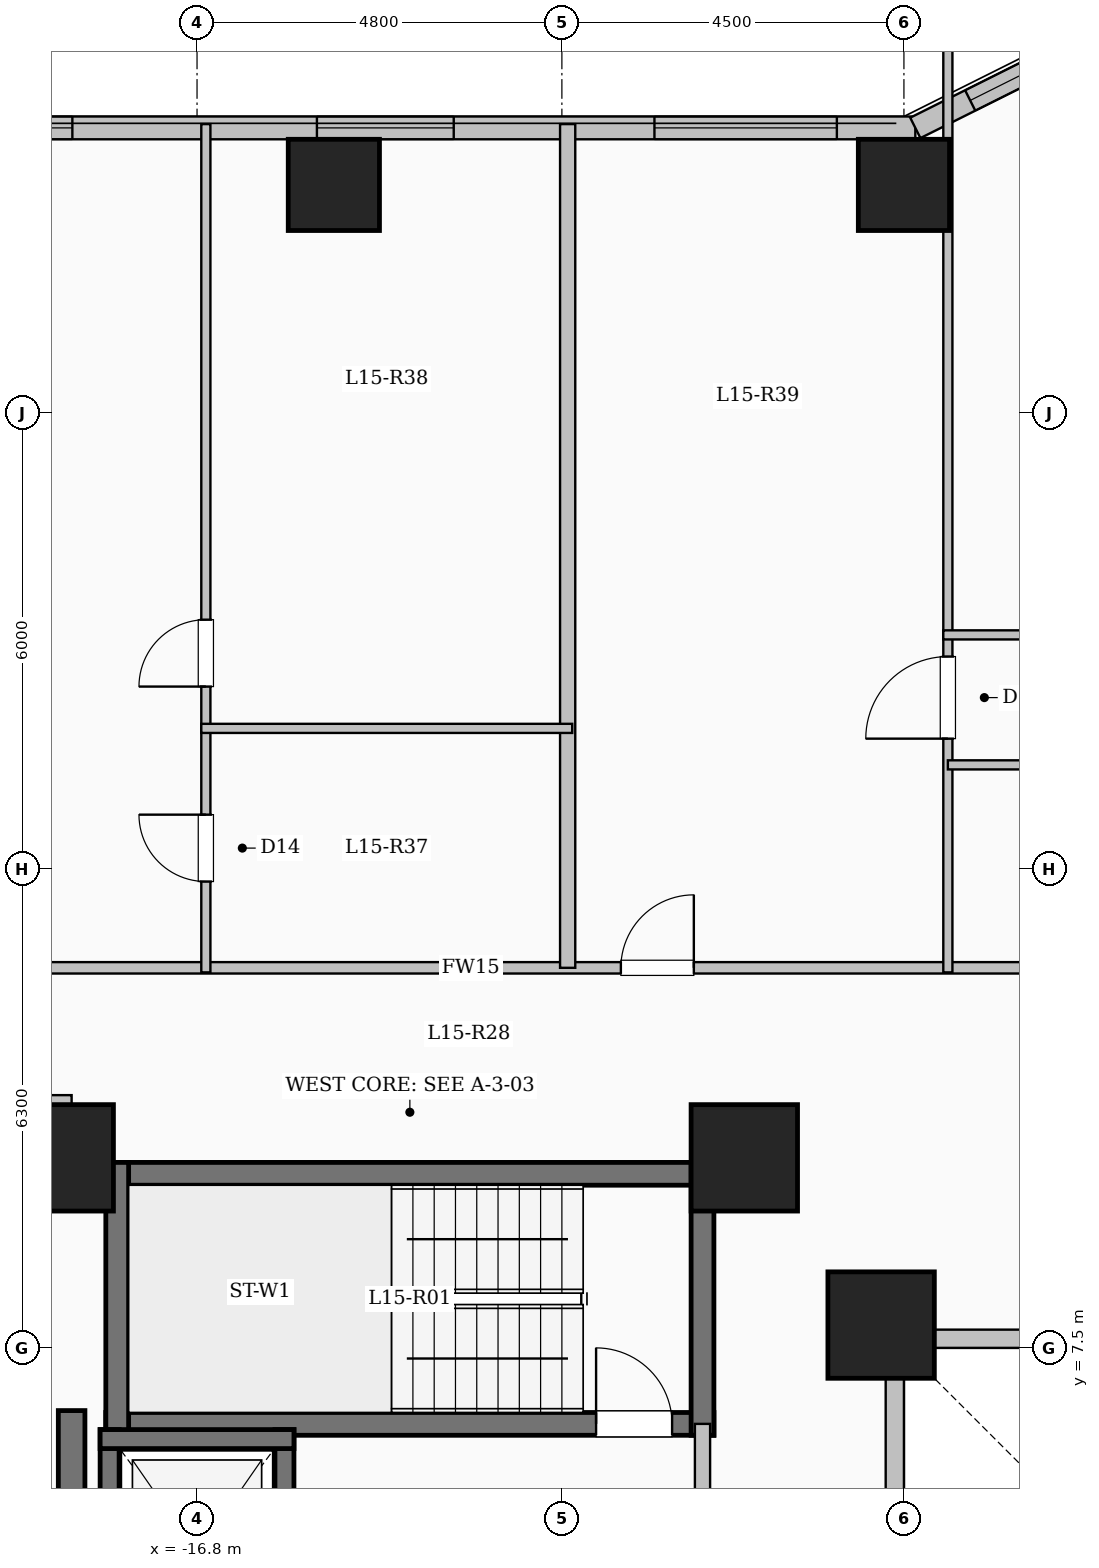
"""IFC4 building model, lengths in metres.
Left out: names, types, materials, properties, quantities, classifications, styles, units other than length and angle.
Written with IfcOpenShell. Run it as: python <this file> out.ifc"""

import sys

from ifc_helpers import new_model, si_unit, direction, frame, frame_2d, origin, origin_2d, place, context, subcontext, project, spatial, rectangle, extrude, element, fill, save


model = new_model("IFC4")
c1 = context("Model", 3, precision=1e-05, world=origin(), true_north=direction((0.0, 1.0)))
c2 = subcontext(c1, "Body", "Model", "MODEL_VIEW")
j1 = project(units=[si_unit("LENGTHUNIT", "METRE"), si_unit("PLANEANGLEUNIT", "RADIAN")], contexts=[c1])
p1 = place(None, origin())
s1 = spatial("IfcSite", under=j1, at=p1, CompositionType="ELEMENT")
p2 = place(p1, origin())
s2 = spatial("IfcBuilding", under=s1, at=p2, CompositionType="ELEMENT")
p3 = place(p2, frame((0.0, 0.0, 57.5)))
s3 = spatial("IfcBuildingStorey", under=s2, at=p3, CompositionType="ELEMENT", Elevation=57.5)
for number, where, z_axis, x_axis in (
    (1, (-7.8, 7.8, 0.0), (0.0, 0.0, 1.0), (1.0, 0.0, 0.0)),
    (2, (-9.6, 10.0, 0.0), (0.0, 0.0, 1.0), (1.0, 0.0, 0.0)),
    (3, (-18.6, 10.0, 0.0), (0.0, 0.0, 1.0), (1.0, 0.0, 0.0)),
):
    element("IfcColumn", number, at=place(p3, frame(where, z_axis=z_axis, x_axis=x_axis)), inside=s3, PredefinedType="COLUMN", context=c2, shape_type="SweptSolid", body=[
        extrude(rectangle(XDim=1.4, YDim=1.4, at=origin_2d()), origin(), (0.0, 0.0, 1.0), 3.35),
    ])
for number, where, z_axis, x_axis in (
    (4, (-15.0, 22.8, 0.0), (0.0, 0.0, 1.0), (1.0, 0.0, 0.0)),
    (5, (-7.5, 22.8, 0.0), (0.0, 0.0, 1.0), (1.0, 0.0, 0.0)),
):
    element("IfcColumn", number, at=place(p3, frame(where, z_axis=z_axis, x_axis=x_axis)), inside=s3, PredefinedType="COLUMN", context=c2, shape_type="SweptSolid", body=[
        extrude(rectangle(XDim=1.2, YDim=1.2, at=origin_2d()), origin(), (0.0, 0.0, 1.0), 3.35),
    ])
p4 = place(p3, frame((7.62, 7.62, 0.0), z_axis=(0.0, 0.0, 1.0), x_axis=(-1.0, 0.0, 0.0)))
e6 = element("IfcWall", 6, at=p4, inside=s3, PredefinedType="SOLIDWALL", context=c2, shape_type="SweptSolid", body=[
    extrude(rectangle(XDim=15.24, YDim=0.24, at=frame_2d((7.62, 0.0))), origin(), (0.0, 0.0, 1.0), 3.1),
])
p5 = place(p4, frame((6.92, 0.0, 0.95)))
e7 = element("IfcOpeningElement", 7, at=p5, cuts=e6, PredefinedType="OPENING", context=c2, shape_type="SweptSolid", body=[
    extrude(rectangle(XDim=1.4, YDim=1.5, at=frame_2d((0.7, 0.75))), frame((0.0, 0.13, 0.0), z_axis=(0.0, -1.0, 0.0), x_axis=(1.0, 0.0, 0.0)), (0.0, 0.0, 1.0), 0.26),
])
p6 = place(p3, frame((-7.62, 7.62, 0.0), z_axis=(0.0, 0.0, 1.0), x_axis=(0.0, -1.0, 0.0)))
e8 = element("IfcWall", 8, at=p6, inside=s3, PredefinedType="SOLIDWALL", context=c2, shape_type="SweptSolid", body=[
    extrude(rectangle(XDim=15.24, YDim=0.24, at=frame_2d((7.62, 0.0))), origin(), (0.0, 0.0, 1.0), 3.1),
])
p7 = place(p6, frame((6.92, 0.0, 0.95)))
e9 = element("IfcOpeningElement", 9, at=p7, cuts=e8, PredefinedType="OPENING", context=c2, shape_type="SweptSolid", body=[
    extrude(rectangle(XDim=1.4, YDim=1.5, at=frame_2d((0.7, 0.75))), frame((0.0, 0.13, 0.0), z_axis=(0.0, -1.0, 0.0), x_axis=(1.0, 0.0, 0.0)), (0.0, 0.0, 1.0), 0.26),
])
p8 = place(p3, frame((-22.65, 23.55, 0.0), z_axis=(0.0, 0.0, 1.0), x_axis=(1.0, 0.0, 0.0)))
e10 = element("IfcWall", 10, at=p8, inside=s3, PredefinedType="SOLIDWALL", context=c2, shape_type="SweptSolid", body=[
    extrude(rectangle(XDim=15.3, YDim=0.3, at=frame_2d((7.65, 0.0))), origin(), (0.0, 0.0, 1.0), 3.1),
])
p9 = place(p8, frame((1.81, 0.0, 0.9)))
e11 = element("IfcOpeningElement", 11, at=p9, cuts=e10, PredefinedType="OPENING", context=c2, shape_type="SweptSolid", body=[
    extrude(rectangle(XDim=2.4, YDim=1.8, at=frame_2d((1.2, 0.9))), frame((0.0, 0.16, 0.0), z_axis=(0.0, -1.0, 0.0), x_axis=(1.0, 0.0, 0.0)), (0.0, 0.0, 1.0), 0.32),
])
p10 = place(p8, frame((7.427, 0.0, 0.9)))
e12 = element("IfcOpeningElement", 12, at=p10, cuts=e10, PredefinedType="OPENING", context=c2, shape_type="SweptSolid", body=[
    extrude(rectangle(XDim=1.8, YDim=1.65, at=frame_2d((0.9, 0.825))), frame((0.0, 0.16, 0.0), z_axis=(0.0, -1.0, 0.0), x_axis=(1.0, 0.0, 0.0)), (0.0, 0.0, 1.0), 0.32),
])
p11 = place(p8, frame((11.868, 0.0, 0.9)))
e13 = element("IfcOpeningElement", 13, at=p11, cuts=e10, PredefinedType="OPENING", context=c2, shape_type="SweptSolid", body=[
    extrude(rectangle(XDim=2.4, YDim=1.8, at=frame_2d((1.2, 0.9))), frame((0.0, 0.16, 0.0), z_axis=(0.0, -1.0, 0.0), x_axis=(1.0, 0.0, 0.0)), (0.0, 0.0, 1.0), 0.32),
])
p12 = place(p3, frame((-7.35, 23.55, 0.0), z_axis=(0.0, 0.0, 1.0), x_axis=(0.894427191, 0.4472135955, 0.0)))
e14 = element("IfcWall", 14, at=p12, inside=s3, PredefinedType="SOLIDWALL", context=c2, shape_type="SweptSolid", body=[
    extrude(rectangle(XDim=3.354, YDim=0.3, at=frame_2d((1.677, 0.0))), origin(), (0.0, 0.0, 1.0), 3.1),
])
p13 = place(p12, frame((0.807, 0.0, 0.9)))
e15 = element("IfcOpeningElement", 15, at=p13, cuts=e14, PredefinedType="OPENING", context=c2, shape_type="SweptSolid", body=[
    extrude(rectangle(XDim=1.8, YDim=1.65, at=frame_2d((0.9, 0.825))), frame((0.0, 0.16, 0.0), z_axis=(0.0, -1.0, 0.0), x_axis=(1.0, 0.0, 0.0)), (0.0, 0.0, 1.0), 0.32),
])
p14 = place(p3, frame((-18.0, 9.79, 0.0), z_axis=(0.0, 0.0, 1.0), x_axis=(1.0, 0.0, 0.0)))
e16 = element("IfcWall", 16, at=p14, inside=s3, PredefinedType="SHEAR", context=c2, shape_type="SweptSolid", body=[
    extrude(rectangle(XDim=8.0, YDim=0.3, at=frame_2d((4.0, 0.0))), origin(), (0.0, 0.0, 1.0), 3.35),
])
p15 = place(p3, frame((-18.0, 6.5, 0.0), z_axis=(0.0, 0.0, 1.0), x_axis=(1.0, 0.0, 0.0)))
e17 = element("IfcWall", 17, at=p15, inside=s3, PredefinedType="SHEAR", context=c2, shape_type="SweptSolid", body=[
    extrude(rectangle(XDim=8.0, YDim=0.3, at=frame_2d((4.0, 0.0))), origin(), (0.0, 0.0, 1.0), 3.35),
])
p16 = place(p15, frame((6.45, 0.0, 0.0)))
e18 = element("IfcOpeningElement", 18, at=p16, cuts=e17, PredefinedType="OPENING", context=c2, shape_type="SweptSolid", body=[
    extrude(rectangle(XDim=1.0, YDim=2.15, at=frame_2d((0.5, 1.075))), frame((0.0, 0.16, 0.0), z_axis=(0.0, -1.0, 0.0), x_axis=(1.0, 0.0, 0.0)), (0.0, 0.0, 1.0), 0.32),
])
for number, where, z_axis, x_axis in (
    (19, (-17.85, 6.35, 0.0), (0.0, 0.0, 1.0), (0.0, 1.0, 0.0)),
    (20, (-10.15, 6.35, 0.0), (0.0, 0.0, 1.0), (0.0, 1.0, 0.0)),
):
    element("IfcWall", number, at=place(p3, frame(where, z_axis=z_axis, x_axis=x_axis)), inside=s3, PredefinedType="SHEAR", context=c2, shape_type="SweptSolid", body=[
        extrude(rectangle(XDim=3.59, YDim=0.3, at=frame_2d((1.795, 0.0))), origin(), (0.0, 0.0, 1.0), 3.35),
    ])
p17 = place(p3, frame((-10.15, 3.25, 0.0), z_axis=(0.0, 0.0, 1.0), x_axis=(0.0, 1.0, 0.0)))
e21 = element("IfcWall", 21, at=p17, inside=s3, PredefinedType="SOLIDWALL", context=c2, shape_type="SweptSolid", body=[
    extrude(rectangle(XDim=3.25, YDim=0.2, at=frame_2d((1.625, 0.0))), origin(), (0.0, 0.0, 1.0), 3.1),
])
p18 = place(p17, frame((1.1, 0.0, 0.0)))
e22 = element("IfcOpeningElement", 22, at=p18, cuts=e21, PredefinedType="OPENING", context=c2, shape_type="SweptSolid", body=[
    extrude(rectangle(XDim=1.02, YDim=2.15, at=frame_2d((0.51, 1.075))), frame((0.0, 0.11, 0.0), z_axis=(0.0, -1.0, 0.0), x_axis=(1.0, 0.0, 0.0)), (0.0, 0.0, 1.0), 0.22),
])
p19 = place(p3, frame((-17.95, 3.175, 0.0), z_axis=(0.0, 0.0, 1.0), x_axis=(0.0, 1.0, 0.0)))
e23 = element("IfcWall", 23, at=p19, inside=s3, PredefinedType="SHEAR", context=c2, shape_type="SweptSolid", body=[
    extrude(rectangle(XDim=3.25, YDim=0.25, at=frame_2d((1.625, 0.0))), origin(), (0.0, 0.0, 1.0), 3.35),
])
p20 = place(p3, frame((-15.65, 3.175, 0.0), z_axis=(0.0, 0.0, 1.0), x_axis=(0.0, 1.0, 0.0)))
e24 = element("IfcWall", 24, at=p20, inside=s3, PredefinedType="SHEAR", context=c2, shape_type="SweptSolid", body=[
    extrude(rectangle(XDim=3.25, YDim=0.25, at=frame_2d((1.625, 0.0))), origin(), (0.0, 0.0, 1.0), 3.35),
])
p21 = place(p20, frame((1.075, 0.0, 0.0)))
e25 = element("IfcOpeningElement", 25, at=p21, cuts=e24, PredefinedType="OPENING", context=c2, shape_type="SweptSolid", body=[
    extrude(rectangle(XDim=1.1, YDim=2.15, at=frame_2d((0.55, 1.075))), frame((0.0, 0.135, 0.0), z_axis=(0.0, -1.0, 0.0), x_axis=(1.0, 0.0, 0.0)), (0.0, 0.0, 1.0), 0.27),
])
p22 = place(p3, frame((-18.075, 6.3, 0.0), z_axis=(0.0, 0.0, 1.0), x_axis=(1.0, 0.0, 0.0)))
e26 = element("IfcWall", 26, at=p22, inside=s3, PredefinedType="SHEAR", context=c2, shape_type="SweptSolid", body=[
    extrude(rectangle(XDim=2.55, YDim=0.25, at=frame_2d((1.275, 0.0))), origin(), (0.0, 0.0, 1.0), 3.35),
])
p23 = place(p3, frame((-18.45, -7.375, 0.0), z_axis=(0.0, 0.0, 1.0), x_axis=(0.0, 1.0, 0.0)))
e27 = element("IfcWall", 27, at=p23, inside=s3, PredefinedType="SHEAR", context=c2, shape_type="SweptSolid", body=[
    extrude(rectangle(XDim=14.05, YDim=0.35, at=frame_2d((7.025, 0.0))), origin(), (0.0, 0.0, 1.0), 3.35),
])
p24 = place(p3, frame((-22.55, 12.5, 0.0), z_axis=(0.0, 0.0, 1.0), x_axis=(1.0, 0.0, 0.0)))
e28 = element("IfcWall", 28, at=p24, inside=s3, PredefinedType="PARTITIONING", context=c2, shape_type="SweptSolid", body=[
    extrude(rectangle(XDim=18.7, YDim=0.15, at=frame_2d((9.35, 0.0))), origin(), (0.0, 0.0, 1.0), 3.1),
])
p25 = place(p24, frame((0.7, 0.0, 0.0)))
e29 = element("IfcOpeningElement", 29, at=p25, cuts=e28, PredefinedType="OPENING", context=c2, shape_type="SweptSolid", body=[
    extrude(rectangle(XDim=0.96, YDim=2.15, at=frame_2d((0.48, 1.075))), frame((0.0, 0.085, 0.0), z_axis=(0.0, -1.0, 0.0), x_axis=(1.0, 0.0, 0.0)), (0.0, 0.0, 1.0), 0.17),
])
p26 = place(p24, frame((11.326, 0.0, 0.0)))
e30 = element("IfcOpeningElement", 30, at=p26, cuts=e28, PredefinedType="OPENING", context=c2, shape_type="SweptSolid", body=[
    extrude(rectangle(XDim=0.96, YDim=2.15, at=frame_2d((0.48, 1.075))), frame((0.0, 0.085, 0.0), z_axis=(0.0, -1.0, 0.0), x_axis=(1.0, 0.0, 0.0)), (0.0, 0.0, 1.0), 0.17),
])
p27 = place(p3, frame((-11.924, 12.5, 0.0), z_axis=(0.0, 0.0, 1.0), x_axis=(0.0, 1.0, 0.0)))
e31 = element("IfcWall", 31, at=p27, inside=s3, PredefinedType="SOLIDWALL", context=c2, shape_type="SweptSolid", body=[
    extrude(rectangle(XDim=11.1, YDim=0.2, at=frame_2d((5.55, 0.0))), origin(), (0.0, 0.0, 1.0), 3.1),
])
p28 = place(p3, frame((-16.684, 12.44, 0.0), z_axis=(0.0, 0.0, 1.0), x_axis=(0.0, 1.0, 0.0)))
e32 = element("IfcWall", 32, at=p28, inside=s3, PredefinedType="PARTITIONING", context=c2, shape_type="SweptSolid", body=[
    extrude(rectangle(XDim=3.21, YDim=0.12, at=frame_2d((1.605, 0.0))), origin(), (0.0, 0.0, 1.0), 3.1),
])
p29 = place(p28, frame((1.195, 0.0, 0.0)))
e33 = element("IfcOpeningElement", 33, at=p29, cuts=e32, PredefinedType="OPENING", context=c2, shape_type="SweptSolid", body=[
    extrude(rectangle(XDim=0.88, YDim=2.1, at=frame_2d((0.44, 1.05))), frame((0.0, 0.07, 0.0), z_axis=(0.0, -1.0, 0.0), x_axis=(1.0, 0.0, 0.0)), (0.0, 0.0, 1.0), 0.14),
])
p30 = place(p3, frame((-16.684, 15.65, 0.0), z_axis=(0.0, 0.0, 1.0), x_axis=(0.0, 1.0, 0.0)))
e34 = element("IfcWall", 34, at=p30, inside=s3, PredefinedType="PARTITIONING", context=c2, shape_type="SweptSolid", body=[
    extrude(rectangle(XDim=7.95, YDim=0.12, at=frame_2d((3.975, 0.0))), origin(), (0.0, 0.0, 1.0), 3.1),
])
p31 = place(p30, frame((0.55, 0.0, 0.0)))
e35 = element("IfcOpeningElement", 35, at=p31, cuts=e34, PredefinedType="OPENING", context=c2, shape_type="SweptSolid", body=[
    extrude(rectangle(XDim=0.88, YDim=2.1, at=frame_2d((0.44, 1.05))), frame((0.0, 0.07, 0.0), z_axis=(0.0, -1.0, 0.0), x_axis=(1.0, 0.0, 0.0)), (0.0, 0.0, 1.0), 0.14),
])
p32 = place(p3, frame((-16.744, 15.65, 0.0), z_axis=(0.0, 0.0, 1.0), x_axis=(1.0, 0.0, 0.0)))
e36 = element("IfcWall", 36, at=p32, inside=s3, PredefinedType="PARTITIONING", context=c2, shape_type="SweptSolid", body=[
    extrude(rectangle(XDim=4.88, YDim=0.12, at=frame_2d((2.44, 0.0))), origin(), (0.0, 0.0, 1.0), 3.1),
])
p33 = place(p3, frame((-6.922, 12.44, 0.0), z_axis=(0.0, 0.0, 1.0), x_axis=(0.0, 1.0, 0.0)))
e37 = element("IfcWall", 37, at=p33, inside=s3, PredefinedType="PARTITIONING", context=c2, shape_type="SweptSolid", body=[
    extrude(rectangle(XDim=12.166, YDim=0.12, at=frame_2d((6.083, 0.0))), origin(), (0.0, 0.0, 1.0), 3.1),
])
p34 = place(p33, frame((3.075, 0.0, 0.0)))
e38 = element("IfcOpeningElement", 38, at=p34, cuts=e37, PredefinedType="OPENING", context=c2, shape_type="SweptSolid", body=[
    extrude(rectangle(XDim=1.08, YDim=2.15, at=frame_2d((0.54, 1.075))), frame((0.0, 0.07, 0.0), z_axis=(0.0, -1.0, 0.0), x_axis=(1.0, 0.0, 0.0)), (0.0, 0.0, 1.0), 0.14),
])
p35 = place(p3, frame((-6.922, 15.17, 0.0), z_axis=(0.0, 0.0, 1.0), x_axis=(1.0, 0.0, 0.0)))
e39 = element("IfcWall", 39, at=p35, inside=s3, PredefinedType="PARTITIONING", context=c2, shape_type="SweptSolid", body=[
    extrude(rectangle(XDim=4.225, YDim=0.12, at=frame_2d((2.113, 0.0))), origin(), (0.0, 0.0, 1.0), 3.1),
])
p36 = place(p35, frame((1.672, 0.0, 0.0)))
e40 = element("IfcOpeningElement", 40, at=p36, cuts=e39, PredefinedType="OPENING", context=c2, shape_type="SweptSolid", body=[
    extrude(rectangle(XDim=0.88, YDim=2.1, at=frame_2d((0.44, 1.05))), frame((0.0, 0.07, 0.0), z_axis=(0.0, -1.0, 0.0), x_axis=(1.0, 0.0, 0.0)), (0.0, 0.0, 1.0), 0.14),
])
p37 = place(p3, frame((-6.982, 16.88, 0.0), z_axis=(0.0, 0.0, 1.0), x_axis=(1.0, 0.0, 0.0)))
e41 = element("IfcWall", 41, at=p37, inside=s3, PredefinedType="PARTITIONING", context=c2, shape_type="SweptSolid", body=[
    extrude(rectangle(XDim=7.592, YDim=0.12, at=frame_2d((3.796, 0.0))), origin(), (0.0, 0.0, 1.0), 3.1),
])
p38 = place(p37, frame((1.413, 0.0, 0.0)))
e42 = element("IfcOpeningElement", 42, at=p38, cuts=e41, PredefinedType="OPENING", context=c2, shape_type="SweptSolid", body=[
    extrude(rectangle(XDim=0.88, YDim=2.1, at=frame_2d((0.44, 1.05))), frame((0.0, 0.07, 0.0), z_axis=(0.0, -1.0, 0.0), x_axis=(1.0, 0.0, 0.0)), (0.0, 0.0, 1.0), 0.14),
])
p39 = place(p37, frame((5.119, 0.0, 0.0)))
e43 = element("IfcOpeningElement", 43, at=p39, cuts=e41, PredefinedType="OPENING", context=c2, shape_type="SweptSolid", body=[
    extrude(rectangle(XDim=0.88, YDim=2.1, at=frame_2d((0.44, 1.05))), frame((0.0, 0.07, 0.0), z_axis=(0.0, -1.0, 0.0), x_axis=(1.0, 0.0, 0.0)), (0.0, 0.0, 1.0), 0.14),
])
p40 = place(p3, frame((-28.68, 10.75, 0.0), z_axis=(0.0, 0.0, 1.0), x_axis=(1.0, 0.0, 0.0)))
e44 = element("IfcWall", 44, at=p40, inside=s3, PredefinedType="PARTITIONING", context=c2, shape_type="SweptSolid", body=[
    extrude(rectangle(XDim=10.23, YDim=0.15, at=frame_2d((5.115, 0.0))), origin(), (0.0, 0.0, 1.0), 3.1),
])
p41 = place(p9, origin())
e45 = element("IfcWindow", 45, at=p41, inside=s3, PartitioningType="SINGLE_PANEL", PredefinedType="WINDOW", context=c2, shape_type="SweptSolid", body=[
    extrude(rectangle(XDim=2.4, YDim=1.8, at=frame_2d((1.2, 0.9))), frame((0.0, 0.03, 0.0), z_axis=(0.0, -1.0, 0.0), x_axis=(1.0, 0.0, 0.0)), (0.0, 0.0, 1.0), 0.06),
])
fill(e11, e45)
p42 = place(p10, origin())
e46 = element("IfcWindow", 46, at=p42, inside=s3, PartitioningType="SINGLE_PANEL", PredefinedType="WINDOW", context=c2, shape_type="SweptSolid", body=[
    extrude(rectangle(XDim=1.8, YDim=1.65, at=frame_2d((0.9, 0.825))), frame((0.0, 0.03, 0.0), z_axis=(0.0, -1.0, 0.0), x_axis=(1.0, 0.0, 0.0)), (0.0, 0.0, 1.0), 0.06),
])
fill(e12, e46)
p43 = place(p11, origin())
e47 = element("IfcWindow", 47, at=p43, inside=s3, PartitioningType="SINGLE_PANEL", PredefinedType="WINDOW", context=c2, shape_type="SweptSolid", body=[
    extrude(rectangle(XDim=2.4, YDim=1.8, at=frame_2d((1.2, 0.9))), frame((0.0, 0.03, 0.0), z_axis=(0.0, -1.0, 0.0), x_axis=(1.0, 0.0, 0.0)), (0.0, 0.0, 1.0), 0.06),
])
fill(e13, e47)
p44 = place(p13, origin())
e48 = element("IfcWindow", 48, at=p44, inside=s3, PartitioningType="SINGLE_PANEL", PredefinedType="WINDOW", context=c2, shape_type="SweptSolid", body=[
    extrude(rectangle(XDim=1.8, YDim=1.65, at=frame_2d((0.9, 0.825))), frame((0.0, 0.03, 0.0), z_axis=(0.0, -1.0, 0.0), x_axis=(1.0, 0.0, 0.0)), (0.0, 0.0, 1.0), 0.06),
])
fill(e15, e48)
p45 = place(p16, origin())
e49 = element("IfcDoor", 49, at=p45, inside=s3, OperationType="SINGLE_SWING_LEFT", PredefinedType="DOOR", context=c2, shape_type="SweptSolid", body=[
    extrude(rectangle(XDim=1.0, YDim=2.15, at=frame_2d((0.5, 1.075))), frame((0.0, 0.025, 0.0), z_axis=(0.0, -1.0, 0.0), x_axis=(1.0, 0.0, 0.0)), (0.0, 0.0, 1.0), 0.05),
])
fill(e18, e49)
p46 = place(p29, origin())
e50 = element("IfcDoor", 50, at=p46, inside=s3, OperationType="SINGLE_SWING_RIGHT", PredefinedType="DOOR", context=c2, shape_type="SweptSolid", body=[
    extrude(rectangle(XDim=0.88, YDim=2.1, at=frame_2d((0.44, 1.05))), frame((0.0, 0.025, 0.0), z_axis=(0.0, -1.0, 0.0), x_axis=(1.0, 0.0, 0.0)), (0.0, 0.0, 1.0), 0.05),
])
fill(e33, e50)
p47 = place(p31, origin())
e51 = element("IfcDoor", 51, at=p47, inside=s3, OperationType="SINGLE_SWING_LEFT", PredefinedType="DOOR", context=c2, shape_type="SweptSolid", body=[
    extrude(rectangle(XDim=0.88, YDim=2.1, at=frame_2d((0.44, 1.05))), frame((0.0, 0.025, 0.0), z_axis=(0.0, -1.0, 0.0), x_axis=(1.0, 0.0, 0.0)), (0.0, 0.0, 1.0), 0.05),
])
fill(e35, e51)
p48 = place(p26, origin())
e52 = element("IfcDoor", 52, at=p48, inside=s3, OperationType="SINGLE_SWING_RIGHT", PredefinedType="DOOR", context=c2, shape_type="SweptSolid", body=[
    extrude(rectangle(XDim=0.96, YDim=2.15, at=frame_2d((0.48, 1.075))), frame((0.0, 0.025, 0.0), z_axis=(0.0, -1.0, 0.0), x_axis=(1.0, 0.0, 0.0)), (0.0, 0.0, 1.0), 0.05),
])
fill(e30, e52)
p49 = place(p34, origin())
e53 = element("IfcDoor", 53, at=p49, inside=s3, OperationType="SINGLE_SWING_LEFT", PredefinedType="DOOR", context=c2, shape_type="SweptSolid", body=[
    extrude(rectangle(XDim=1.08, YDim=2.15, at=frame_2d((0.54, 1.075))), frame((0.0, 0.025, 0.0), z_axis=(0.0, -1.0, 0.0), x_axis=(1.0, 0.0, 0.0)), (0.0, 0.0, 1.0), 0.05),
])
fill(e38, e53)
save(model, sys.argv[1])
